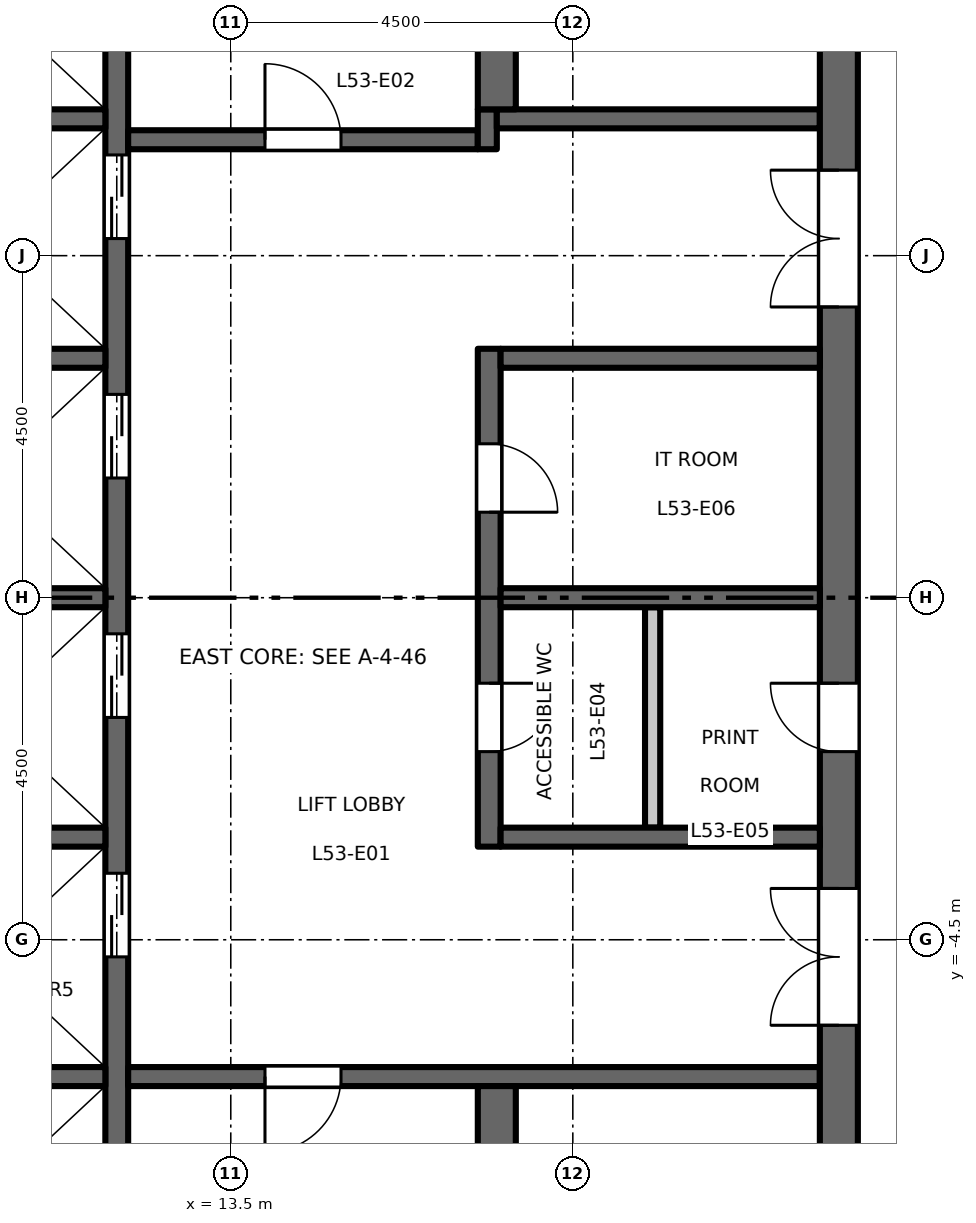
"""IFC4 building model, lengths in metres.
Left out: names, types, materials, properties, quantities, classifications, styles, units other than length and angle.
Written with IfcOpenShell. Run it as: python <this file> out.ifc"""

import sys

from ifc_helpers import new_model, si_unit, direction, frame, frame_2d, origin, place, context, subcontext, project, spatial, rectangle, extrude, element, fill, save


model = new_model("IFC4")
c1 = context("Model", 3, precision=1e-05, world=origin(), true_north=direction((0.0, 1.0)))
c2 = subcontext(c1, "Body", "Model", "MODEL_VIEW")
j1 = project(units=[si_unit("LENGTHUNIT", "METRE"), si_unit("PLANEANGLEUNIT", "RADIAN")], contexts=[c1])
p1 = place(None, origin())
s1 = spatial("IfcSite", under=j1, at=p1, CompositionType="ELEMENT")
p2 = place(p1, origin())
s2 = spatial("IfcBuilding", under=s1, at=p2, CompositionType="ELEMENT")
p3 = place(p2, frame((0.0, 0.0, 246.7)))
s3 = spatial("IfcBuildingStorey", under=s2, at=p3, CompositionType="ELEMENT", Elevation=246.7)
p4 = place(p3, frame((12.0, -9.45, 0.0), z_axis=(0.0, 0.0, 1.0), x_axis=(0.0, 1.0, 0.0)))
e1 = element("IfcWall", 1, at=p4, inside=s3, PredefinedType="SHEAR", context=c2, shape_type="SweptSolid", body=[
    extrude(rectangle(XDim=18.9, YDim=0.3, at=frame_2d((9.45, 0.0))), origin(), (0.0, 0.0, 1.0), 4.35),
])
p5 = place(p4, frame((4.725, 0.0, 0.0)))
e2 = element("IfcOpeningElement", 2, at=p5, cuts=e1, PredefinedType="OPENING", context=c2, shape_type="SweptSolid", body=[
    extrude(rectangle(XDim=1.1, YDim=2.1, at=frame_2d((0.55, 1.05))), frame((0.0, 0.16, 0.0), z_axis=(0.0, -1.0, 0.0), x_axis=(1.0, 0.0, 0.0)), (0.0, 0.0, 1.0), 0.32),
])
p6 = place(p4, frame((7.875, 0.0, 0.0)))
e3 = element("IfcOpeningElement", 3, at=p6, cuts=e1, PredefinedType="OPENING", context=c2, shape_type="SweptSolid", body=[
    extrude(rectangle(XDim=1.1, YDim=2.1, at=frame_2d((0.55, 1.05))), frame((0.0, 0.16, 0.0), z_axis=(0.0, -1.0, 0.0), x_axis=(1.0, 0.0, 0.0)), (0.0, 0.0, 1.0), 0.32),
])
p7 = place(p4, frame((11.025, 0.0, 0.0)))
e4 = element("IfcOpeningElement", 4, at=p7, cuts=e1, PredefinedType="OPENING", context=c2, shape_type="SweptSolid", body=[
    extrude(rectangle(XDim=1.1, YDim=2.1, at=frame_2d((0.55, 1.05))), frame((0.0, 0.16, 0.0), z_axis=(0.0, -1.0, 0.0), x_axis=(1.0, 0.0, 0.0)), (0.0, 0.0, 1.0), 0.32),
])
p8 = place(p4, frame((14.175, 0.0, 0.0)))
e5 = element("IfcOpeningElement", 5, at=p8, cuts=e1, PredefinedType="OPENING", context=c2, shape_type="SweptSolid", body=[
    extrude(rectangle(XDim=1.1, YDim=2.1, at=frame_2d((0.55, 1.05))), frame((0.0, 0.16, 0.0), z_axis=(0.0, -1.0, 0.0), x_axis=(1.0, 0.0, 0.0)), (0.0, 0.0, 1.0), 0.32),
])
p9 = place(p4, frame((16.725, 0.0, 0.0)))
e6 = element("IfcOpeningElement", 6, at=p9, cuts=e1, PredefinedType="OPENING", context=c2, shape_type="SweptSolid", body=[
    extrude(rectangle(XDim=1.2, YDim=2.1, at=frame_2d((0.6, 1.05))), frame((0.0, 0.16, 0.0), z_axis=(0.0, -1.0, 0.0), x_axis=(1.0, 0.0, 0.0)), (0.0, 0.0, 1.0), 0.32),
])
p10 = place(p4, frame((0.975, 0.0, 0.0)))
e7 = element("IfcOpeningElement", 7, at=p10, cuts=e1, PredefinedType="OPENING", context=c2, shape_type="SweptSolid", body=[
    extrude(rectangle(XDim=1.2, YDim=2.1, at=frame_2d((0.6, 1.05))), frame((0.0, 0.16, 0.0), z_axis=(0.0, -1.0, 0.0), x_axis=(1.0, 0.0, 0.0)), (0.0, 0.0, 1.0), 0.32),
])
p11 = place(p3, frame((12.15, 6.025, 0.0), z_axis=(0.0, 0.0, 1.0), x_axis=(1.0, 0.0, 0.0)))
e8 = element("IfcWall", 8, at=p11, inside=s3, PredefinedType="SHEAR", context=c2, shape_type="SweptSolid", body=[
    extrude(rectangle(XDim=4.6, YDim=0.25, at=frame_2d((2.3, 0.0))), origin(), (0.0, 0.0, 1.0), 4.35),
])
p12 = place(p11, frame((1.8, 0.0, 0.0)))
e9 = element("IfcOpeningElement", 9, at=p12, cuts=e8, PredefinedType="OPENING", context=c2, shape_type="SweptSolid", body=[
    extrude(rectangle(XDim=1.0, YDim=2.1, at=frame_2d((0.5, 1.05))), frame((0.0, 0.135, 0.0), z_axis=(0.0, -1.0, 0.0), x_axis=(1.0, 0.0, 0.0)), (0.0, 0.0, 1.0), 0.27),
])
p13 = place(p3, frame((16.875, 5.9, 0.0), z_axis=(0.0, 0.0, 1.0), x_axis=(0.0, 1.0, 0.0)))
e10 = element("IfcWall", 10, at=p13, inside=s3, PredefinedType="SHEAR", context=c2, shape_type="SweptSolid", body=[
    extrude(rectangle(XDim=0.525, YDim=0.25, at=frame_2d((0.263, 0.0))), origin(), (0.0, 0.0, 1.0), 4.35),
])
p14 = place(p3, frame((17.0, 6.3, 0.0), z_axis=(0.0, 0.0, 1.0), x_axis=(1.0, 0.0, 0.0)))
e11 = element("IfcWall", 11, at=p14, inside=s3, PredefinedType="SHEAR", context=c2, shape_type="SweptSolid", body=[
    extrude(rectangle(XDim=4.25, YDim=0.25, at=frame_2d((2.125, 0.0))), origin(), (0.0, 0.0, 1.0), 4.35),
])
p15 = place(p3, frame((12.15, -6.3, 0.0), z_axis=(0.0, 0.0, 1.0), x_axis=(1.0, 0.0, 0.0)))
e12 = element("IfcWall", 12, at=p15, inside=s3, PredefinedType="SHEAR", context=c2, shape_type="SweptSolid", body=[
    extrude(rectangle(XDim=9.1, YDim=0.25, at=frame_2d((4.55, 0.0))), origin(), (0.0, 0.0, 1.0), 4.35),
])
p16 = place(p15, frame((1.8, 0.0, 0.0)))
e13 = element("IfcOpeningElement", 13, at=p16, cuts=e12, PredefinedType="OPENING", context=c2, shape_type="SweptSolid", body=[
    extrude(rectangle(XDim=1.0, YDim=2.1, at=frame_2d((0.5, 1.05))), frame((0.0, 0.135, 0.0), z_axis=(0.0, -1.0, 0.0), x_axis=(1.0, 0.0, 0.0)), (0.0, 0.0, 1.0), 0.27),
])
p17 = place(p3, frame((21.5, -13.0, 0.0), z_axis=(0.0, 0.0, 1.0), x_axis=(0.0, 1.0, 0.0)))
e14 = element("IfcWall", 14, at=p17, inside=s3, PredefinedType="SHEAR", context=c2, shape_type="SweptSolid", body=[
    extrude(rectangle(XDim=26.0, YDim=0.5, at=frame_2d((13.0, 0.0))), origin(), (0.0, 0.0, 1.0), 4.35),
])
p18 = place(p17, frame((16.825, 0.0, 0.0)))
e15 = element("IfcOpeningElement", 15, at=p18, cuts=e14, PredefinedType="OPENING", context=c2, shape_type="SweptSolid", body=[
    extrude(rectangle(XDim=1.8, YDim=2.1, at=frame_2d((0.9, 1.05))), frame((0.0, 0.26, 0.0), z_axis=(0.0, -1.0, 0.0), x_axis=(1.0, 0.0, 0.0)), (0.0, 0.0, 1.0), 0.52),
])
p19 = place(p17, frame((7.375, 0.0, 0.0)))
e16 = element("IfcOpeningElement", 16, at=p19, cuts=e14, PredefinedType="OPENING", context=c2, shape_type="SweptSolid", body=[
    extrude(rectangle(XDim=1.8, YDim=2.1, at=frame_2d((0.9, 1.05))), frame((0.0, 0.26, 0.0), z_axis=(0.0, -1.0, 0.0), x_axis=(1.0, 0.0, 0.0)), (0.0, 0.0, 1.0), 0.52),
])
p20 = place(p17, frame((10.975, 0.0, 0.0)))
e17 = element("IfcOpeningElement", 17, at=p20, cuts=e14, PredefinedType="OPENING", context=c2, shape_type="SweptSolid", body=[
    extrude(rectangle(XDim=0.9, YDim=2.1, at=frame_2d((0.45, 1.05))), frame((0.0, 0.26, 0.0), z_axis=(0.0, -1.0, 0.0), x_axis=(1.0, 0.0, 0.0)), (0.0, 0.0, 1.0), 0.52),
])
p21 = place(p3, frame((16.9, -3.275, 0.0), z_axis=(0.0, 0.0, 1.0), x_axis=(0.0, 1.0, 0.0)))
e18 = element("IfcWall", 18, at=p21, inside=s3, PredefinedType="SHEAR", context=c2, shape_type="SweptSolid", body=[
    extrude(rectangle(XDim=6.55, YDim=0.3, at=frame_2d((3.275, 0.0))), origin(), (0.0, 0.0, 1.0), 4.35),
])
p22 = place(p21, frame((1.25, 0.0, 0.0)))
e19 = element("IfcOpeningElement", 19, at=p22, cuts=e18, PredefinedType="OPENING", context=c2, shape_type="SweptSolid", body=[
    extrude(rectangle(XDim=0.9, YDim=2.1, at=frame_2d((0.45, 1.05))), frame((0.0, 0.16, 0.0), z_axis=(0.0, -1.0, 0.0), x_axis=(1.0, 0.0, 0.0)), (0.0, 0.0, 1.0), 0.32),
])
p23 = place(p21, frame((4.4, 0.0, 0.0)))
e20 = element("IfcOpeningElement", 20, at=p23, cuts=e18, PredefinedType="OPENING", context=c2, shape_type="SweptSolid", body=[
    extrude(rectangle(XDim=0.9, YDim=2.1, at=frame_2d((0.45, 1.05))), frame((0.0, 0.16, 0.0), z_axis=(0.0, -1.0, 0.0), x_axis=(1.0, 0.0, 0.0)), (0.0, 0.0, 1.0), 0.32),
])
for number, where, z_axis, x_axis in (
    (21, (17.05, 0.0, 0.0), (0.0, 0.0, 1.0), (1.0, 0.0, 0.0)),
    (22, (17.05, 3.15, 0.0), (0.0, 0.0, 1.0), (1.0, 0.0, 0.0)),
    (23, (17.05, -3.15, 0.0), (0.0, 0.0, 1.0), (1.0, 0.0, 0.0)),
):
    element("IfcWall", number, at=place(p3, frame(where, z_axis=z_axis, x_axis=x_axis)), inside=s3, PredefinedType="SHEAR", context=c2, shape_type="SweptSolid", body=[
        extrude(rectangle(XDim=4.2, YDim=0.25, at=frame_2d((2.1, 0.0))), origin(), (0.0, 0.0, 1.0), 4.35),
    ])
p24 = place(p3, frame((19.05, -3.025, 0.0), z_axis=(0.0, 0.0, 1.0), x_axis=(0.0, 1.0, 0.0)))
e24 = element("IfcWall", 24, at=p24, inside=s3, PredefinedType="PARTITIONING", context=c2, shape_type="SweptSolid", body=[
    extrude(rectangle(XDim=2.9, YDim=0.2, at=frame_2d((1.45, 0.0))), origin(), (0.0, 0.0, 1.0), 4.35),
])
for number, where, z_axis, x_axis in (
    (25, (17.0, 6.425, 0.0), (0.0, 0.0, 1.0), (0.0, 1.0, 0.0)),
    (26, (17.0, -13.0, 0.0), (0.0, 0.0, 1.0), (0.0, 1.0, 0.0)),
):
    element("IfcWall", number, at=place(p3, frame(where, z_axis=z_axis, x_axis=x_axis)), inside=s3, PredefinedType="SHEAR", context=c2, shape_type="SweptSolid", body=[
        extrude(rectangle(XDim=6.575, YDim=0.5, at=frame_2d((3.288, 0.0))), origin(), (0.0, 0.0, 1.0), 4.35),
    ])
for number, where, z_axis, x_axis in (
    (27, (8.75, 0.0, 0.0), (0.0, 0.0, 1.0), (1.0, 0.0, 0.0)),
    (28, (8.75, 3.15, 0.0), (0.0, 0.0, 1.0), (1.0, 0.0, 0.0)),
    (29, (8.75, 6.3, 0.0), (0.0, 0.0, 1.0), (1.0, 0.0, 0.0)),
    (30, (8.75, -3.15, 0.0), (0.0, 0.0, 1.0), (1.0, 0.0, 0.0)),
    (31, (8.75, -6.3, 0.0), (0.0, 0.0, 1.0), (1.0, 0.0, 0.0)),
):
    element("IfcWall", number, at=place(p3, frame(where, z_axis=z_axis, x_axis=x_axis)), inside=s3, PredefinedType="SHEAR", context=c2, shape_type="SweptSolid", body=[
        extrude(rectangle(XDim=3.1, YDim=0.25, at=frame_2d((1.55, 0.0))), origin(), (0.0, 0.0, 1.0), 4.35),
    ])
p25 = place(p12, origin())
e32 = element("IfcDoor", 32, at=p25, inside=s3, OperationType="SINGLE_SWING_RIGHT", PredefinedType="DOOR", context=c2, shape_type="SweptSolid", body=[
    extrude(rectangle(XDim=1.0, YDim=2.1, at=frame_2d((0.5, 1.05))), frame((0.0, 0.025, 0.0), z_axis=(0.0, -1.0, 0.0), x_axis=(1.0, 0.0, 0.0)), (0.0, 0.0, 1.0), 0.05),
])
fill(e9, e32)
p26 = place(p16, origin())
e33 = element("IfcDoor", 33, at=p26, inside=s3, OperationType="SINGLE_SWING_LEFT", PredefinedType="DOOR", context=c2, shape_type="SweptSolid", body=[
    extrude(rectangle(XDim=1.0, YDim=2.1, at=frame_2d((0.5, 1.05))), frame((0.0, 0.025, 0.0), z_axis=(0.0, -1.0, 0.0), x_axis=(1.0, 0.0, 0.0)), (0.0, 0.0, 1.0), 0.05),
])
fill(e13, e33)
p27 = place(p18, origin())
e34 = element("IfcDoor", 34, at=p27, inside=s3, OperationType="DOUBLE_DOOR_DOUBLE_SWING", PredefinedType="DOOR", context=c2, shape_type="SweptSolid", body=[
    extrude(rectangle(XDim=1.8, YDim=2.1, at=frame_2d((0.9, 1.05))), frame((0.0, 0.025, 0.0), z_axis=(0.0, -1.0, 0.0), x_axis=(1.0, 0.0, 0.0)), (0.0, 0.0, 1.0), 0.05),
])
fill(e15, e34)
p28 = place(p19, origin())
e35 = element("IfcDoor", 35, at=p28, inside=s3, OperationType="DOUBLE_DOOR_DOUBLE_SWING", PredefinedType="DOOR", context=c2, shape_type="SweptSolid", body=[
    extrude(rectangle(XDim=1.8, YDim=2.1, at=frame_2d((0.9, 1.05))), frame((0.0, 0.025, 0.0), z_axis=(0.0, -1.0, 0.0), x_axis=(1.0, 0.0, 0.0)), (0.0, 0.0, 1.0), 0.05),
])
fill(e16, e35)
p29 = place(p5, origin())
e36 = element("IfcDoor", 36, at=p29, inside=s3, OperationType="DOUBLE_DOOR_SLIDING", PredefinedType="DOOR", context=c2, shape_type="SweptSolid", body=[
    extrude(rectangle(XDim=1.1, YDim=2.1, at=frame_2d((0.55, 1.05))), frame((0.0, 0.025, 0.0), z_axis=(0.0, -1.0, 0.0), x_axis=(1.0, 0.0, 0.0)), (0.0, 0.0, 1.0), 0.05),
])
fill(e2, e36)
p30 = place(p6, origin())
e37 = element("IfcDoor", 37, at=p30, inside=s3, OperationType="DOUBLE_DOOR_SLIDING", PredefinedType="DOOR", context=c2, shape_type="SweptSolid", body=[
    extrude(rectangle(XDim=1.1, YDim=2.1, at=frame_2d((0.55, 1.05))), frame((0.0, 0.025, 0.0), z_axis=(0.0, -1.0, 0.0), x_axis=(1.0, 0.0, 0.0)), (0.0, 0.0, 1.0), 0.05),
])
fill(e3, e37)
p31 = place(p7, origin())
e38 = element("IfcDoor", 38, at=p31, inside=s3, OperationType="DOUBLE_DOOR_SLIDING", PredefinedType="DOOR", context=c2, shape_type="SweptSolid", body=[
    extrude(rectangle(XDim=1.1, YDim=2.1, at=frame_2d((0.55, 1.05))), frame((0.0, 0.025, 0.0), z_axis=(0.0, -1.0, 0.0), x_axis=(1.0, 0.0, 0.0)), (0.0, 0.0, 1.0), 0.05),
])
fill(e4, e38)
p32 = place(p8, origin())
e39 = element("IfcDoor", 39, at=p32, inside=s3, OperationType="DOUBLE_DOOR_SLIDING", PredefinedType="DOOR", context=c2, shape_type="SweptSolid", body=[
    extrude(rectangle(XDim=1.1, YDim=2.1, at=frame_2d((0.55, 1.05))), frame((0.0, 0.025, 0.0), z_axis=(0.0, -1.0, 0.0), x_axis=(1.0, 0.0, 0.0)), (0.0, 0.0, 1.0), 0.05),
])
fill(e5, e39)
p33 = place(p22, origin())
e40 = element("IfcDoor", 40, at=p33, inside=s3, OperationType="SINGLE_SWING_RIGHT", PredefinedType="DOOR", context=c2, shape_type="SweptSolid", body=[
    extrude(rectangle(XDim=0.9, YDim=2.1, at=frame_2d((0.45, 1.05))), frame((0.0, 0.025, 0.0), z_axis=(0.0, -1.0, 0.0), x_axis=(1.0, 0.0, 0.0)), (0.0, 0.0, 1.0), 0.05),
])
fill(e19, e40)
p34 = place(p20, origin())
e41 = element("IfcDoor", 41, at=p34, inside=s3, OperationType="SINGLE_SWING_LEFT", PredefinedType="DOOR", context=c2, shape_type="SweptSolid", body=[
    extrude(rectangle(XDim=0.9, YDim=2.1, at=frame_2d((0.45, 1.05))), frame((0.0, 0.025, 0.0), z_axis=(0.0, -1.0, 0.0), x_axis=(1.0, 0.0, 0.0)), (0.0, 0.0, 1.0), 0.05),
])
fill(e17, e41)
p35 = place(p23, origin())
e42 = element("IfcDoor", 42, at=p35, inside=s3, OperationType="SINGLE_SWING_LEFT", PredefinedType="DOOR", context=c2, shape_type="SweptSolid", body=[
    extrude(rectangle(XDim=0.9, YDim=2.1, at=frame_2d((0.45, 1.05))), frame((0.0, 0.025, 0.0), z_axis=(0.0, -1.0, 0.0), x_axis=(1.0, 0.0, 0.0)), (0.0, 0.0, 1.0), 0.05),
])
fill(e20, e42)
save(model, sys.argv[1])
